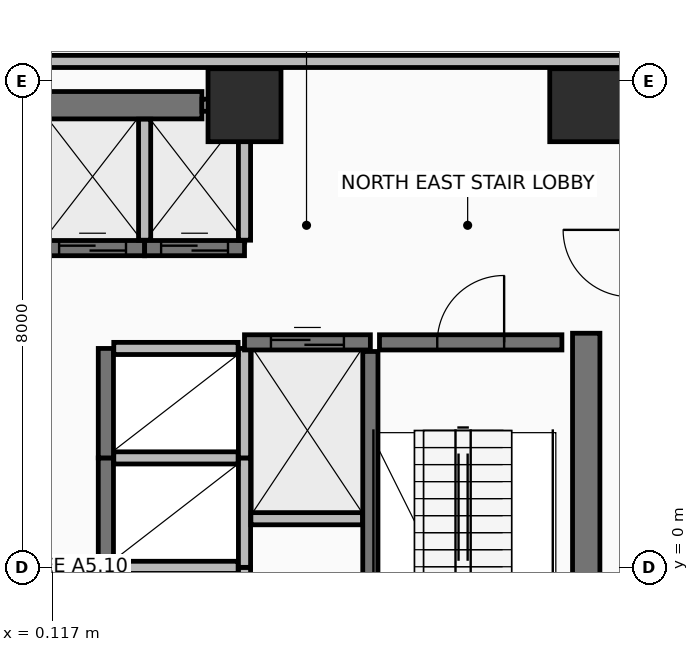
"""IFC4 building model, lengths in metres.
Left out: names, types, materials, properties, quantities, classifications, styles, units other than length and angle.
Written with IfcOpenShell. Run it as: python <this file> out.ifc"""

import sys

from ifc_helpers import new_model, si_unit, direction, frame, frame_2d, origin, origin_2d, place, context, subcontext, project, spatial, rectangle, extrude, element, fill, save


model = new_model("IFC4")
c1 = context("Model", 3, precision=1e-05, world=origin(), true_north=direction((0.0, 1.0)))
c2 = subcontext(c1, "Body", "Model", "MODEL_VIEW")
j1 = project(units=[si_unit("LENGTHUNIT", "METRE"), si_unit("PLANEANGLEUNIT", "RADIAN")], contexts=[c1])
p1 = place(None, origin())
s1 = spatial("IfcSite", under=j1, at=p1, CompositionType="ELEMENT")
p2 = place(p1, origin())
s2 = spatial("IfcBuilding", under=s1, at=p2, CompositionType="ELEMENT")
p3 = place(p2, frame((0.0, 0.0, 177.7)))
s3 = spatial("IfcBuildingStorey", under=s2, at=p3, CompositionType="ELEMENT", Elevation=177.7)
for number, where, z_axis, x_axis in (
    (1, (8.9, 7.6, 0.0), (0.0, 0.0, 1.0), (1.0, 0.0, 0.0)),
    (2, (3.28, 7.6, 0.0), (0.0, 0.0, 1.0), (1.0, 0.0, 0.0)),
):
    element("IfcColumn", number, at=place(p3, frame(where, z_axis=z_axis, x_axis=x_axis)), inside=s3, PredefinedType="COLUMN", context=c2, shape_type="SweptSolid", body=[
        extrude(rectangle(XDim=1.2, YDim=1.2, at=origin_2d()), origin(), (0.0, 0.0, 1.0), 3.6),
    ])
p4 = place(p3, frame((-2.8, 7.6, 0.0), z_axis=(0.0, 0.0, 1.0), x_axis=(1.0, 0.0, 0.0)))
e3 = element("IfcWall", 3, at=p4, inside=s3, PredefinedType="SHEAR", context=c2, shape_type="SweptSolid", body=[
    extrude(rectangle(XDim=5.38, YDim=0.45, at=frame_2d((2.69, 0.0))), origin(), (0.0, 0.0, 1.0), 3.42),
])
p5 = place(p3, frame((8.9, -6.85, 0.0), z_axis=(0.0, 0.0, 1.0), x_axis=(0.0, 1.0, 0.0)))
e4 = element("IfcWall", 4, at=p5, inside=s3, PredefinedType="SHEAR", context=c2, shape_type="SweptSolid", body=[
    extrude(rectangle(XDim=10.7, YDim=0.45, at=frame_2d((5.35, 0.0))), origin(), (0.0, 0.0, 1.0), 3.42),
])
p6 = place(p3, frame((9.62, 8.32, 0.0), z_axis=(0.0, 0.0, 1.0), x_axis=(-1.0, 0.0, 0.0)))
e5 = element("IfcWall", 5, at=p6, inside=s3, PredefinedType="PARTITIONING", context=c2, shape_type="SweptSolid", body=[
    extrude(rectangle(XDim=19.24, YDim=0.2, at=frame_2d((9.62, 0.0))), origin(), (0.0, 0.0, 1.0), 2.765),
])
p7 = place(p6, frame((15.745, 0.0, 0.0)))
e6 = element("IfcOpeningElement", 6, at=p7, cuts=e5, PredefinedType="OPENING", context=c2, shape_type="SweptSolid", body=[
    extrude(rectangle(XDim=0.9, YDim=2.1, at=frame_2d((0.45, 1.05))), frame((0.0, 0.11, 0.0), z_axis=(0.0, -1.0, 0.0), x_axis=(1.0, 0.0, 0.0)), (0.0, 0.0, 1.0), 0.22),
])
p8 = place(p6, frame((13.795, 0.0, 0.0)))
e7 = element("IfcOpeningElement", 7, at=p8, cuts=e5, PredefinedType="OPENING", context=c2, shape_type="SweptSolid", body=[
    extrude(rectangle(XDim=0.9, YDim=2.1, at=frame_2d((0.45, 1.05))), frame((0.0, 0.11, 0.0), z_axis=(0.0, -1.0, 0.0), x_axis=(1.0, 0.0, 0.0)), (0.0, 0.0, 1.0), 0.22),
])
p9 = place(p3, frame((5.35, -3.75, 0.0), z_axis=(0.0, 0.0, 1.0), x_axis=(0.0, 1.0, 0.0)))
e8 = element("IfcWall", 8, at=p9, inside=s3, PredefinedType="SHEAR", context=c2, shape_type="SweptSolid", body=[
    extrude(rectangle(XDim=7.3, YDim=0.25, at=frame_2d((3.65, 0.0))), origin(), (0.0, 0.0, 1.0), 3.42),
])
p10 = place(p3, frame((5.5, 3.7, 0.0), z_axis=(0.0, 0.0, 1.0), x_axis=(1.0, 0.0, 0.0)))
e9 = element("IfcWall", 9, at=p10, inside=s3, PredefinedType="SHEAR", context=c2, shape_type="SweptSolid", body=[
    extrude(rectangle(XDim=3.0, YDim=0.25, at=frame_2d((1.5, 0.0))), origin(), (0.0, 0.0, 1.0), 3.42),
])
p11 = place(p10, frame((0.95, 0.0, 0.0)))
e10 = element("IfcOpeningElement", 10, at=p11, cuts=e9, PredefinedType="OPENING", context=c2, shape_type="SweptSolid", body=[
    extrude(rectangle(XDim=1.1, YDim=2.15, at=frame_2d((0.55, 1.075))), frame((0.0, 0.135, 0.0), z_axis=(0.0, -1.0, 0.0), x_axis=(1.0, 0.0, 0.0)), (0.0, 0.0, 1.0), 0.27),
])
p12 = place(p3, frame((-0.075, 5.25, 0.0), z_axis=(0.0, 0.0, 1.0), x_axis=(1.0, 0.0, 0.0)))
e11 = element("IfcWall", 11, at=p12, inside=s3, PredefinedType="SHEAR", context=c2, shape_type="SweptSolid", body=[
    extrude(rectangle(XDim=1.712, YDim=0.25, at=frame_2d((0.856, 0.0))), origin(), (0.0, 0.0, 1.0), 3.42),
])
p13 = place(p12, frame((0.306, 0.0, 0.0)))
e12 = element("IfcOpeningElement", 12, at=p13, cuts=e11, PredefinedType="OPENING", context=c2, shape_type="SweptSolid", body=[
    extrude(rectangle(XDim=1.1, YDim=2.2, at=frame_2d((0.55, 1.1))), frame((0.0, 0.135, 0.0), z_axis=(0.0, -1.0, 0.0), x_axis=(1.0, 0.0, 0.0)), (0.0, 0.0, 1.0), 0.27),
])
p14 = place(p3, frame((1.637, 5.38, 0.0), z_axis=(0.0, 0.0, 1.0), x_axis=(0.0, 1.0, 0.0)))
e13 = element("IfcWall", 13, at=p14, inside=s3, PredefinedType="PARTITIONING", context=c2, shape_type="SweptSolid", body=[
    extrude(rectangle(XDim=1.99, YDim=0.2, at=frame_2d((0.995, 0.0))), origin(), (0.0, 0.0, 1.0), 2.715),
])
p15 = place(p3, frame((1.637, 5.25, 0.0), z_axis=(0.0, 0.0, 1.0), x_axis=(1.0, 0.0, 0.0)))
e14 = element("IfcWall", 14, at=p15, inside=s3, PredefinedType="SHEAR", context=c2, shape_type="SweptSolid", body=[
    extrude(rectangle(XDim=1.643, YDim=0.25, at=frame_2d((0.821, 0.0))), origin(), (0.0, 0.0, 1.0), 3.42),
])
p16 = place(p15, frame((0.271, 0.0, 0.0)))
e15 = element("IfcOpeningElement", 15, at=p16, cuts=e14, PredefinedType="OPENING", context=c2, shape_type="SweptSolid", body=[
    extrude(rectangle(XDim=1.1, YDim=2.2, at=frame_2d((0.55, 1.1))), frame((0.0, 0.135, 0.0), z_axis=(0.0, -1.0, 0.0), x_axis=(1.0, 0.0, 0.0)), (0.0, 0.0, 1.0), 0.27),
])
p17 = place(p3, frame((2.58, 7.6, 0.0), z_axis=(0.0, 0.0, 1.0), x_axis=(1.0, 0.0, 0.0)))
e16 = element("IfcWall", 16, at=p17, inside=s3, PredefinedType="PARTITIONING", context=c2, shape_type="SweptSolid", body=[
    extrude(rectangle(XDim=0.7, YDim=0.2, at=frame_2d((0.35, 0.0))), origin(), (0.0, 0.0, 1.0), 2.715),
])
p18 = place(p3, frame((3.28, 5.38, 0.0), z_axis=(0.0, 0.0, 1.0), x_axis=(0.0, 1.0, 0.0)))
e17 = element("IfcWall", 17, at=p18, inside=s3, PredefinedType="PARTITIONING", context=c2, shape_type="SweptSolid", body=[
    extrude(rectangle(XDim=2.115, YDim=0.2, at=frame_2d((1.058, 0.0))), origin(), (0.0, 0.0, 1.0), 2.715),
])
p19 = place(p3, frame((1.0, -1.8, 0.0), z_axis=(0.0, 0.0, 1.0), x_axis=(0.0, 1.0, 0.0)))
e18 = element("IfcWall", 18, at=p19, inside=s3, PredefinedType="SHEAR", context=c2, shape_type="SweptSolid", body=[
    extrude(rectangle(XDim=1.8, YDim=0.25, at=frame_2d((0.9, 0.0))), origin(), (0.0, 0.0, 1.0), 3.42),
])
p20 = place(p3, frame((3.28, -1.8, 0.0), z_axis=(0.0, 0.0, 1.0), x_axis=(0.0, 1.0, 0.0)))
e19 = element("IfcWall", 19, at=p20, inside=s3, PredefinedType="PARTITIONING", context=c2, shape_type="SweptSolid", body=[
    extrude(rectangle(XDim=1.8, YDim=0.2, at=frame_2d((0.9, 0.0))), origin(), (0.0, 0.0, 1.0), 3.42),
])
p21 = place(p3, frame((1.13, 0.0, 0.0), z_axis=(0.0, 0.0, 1.0), x_axis=(1.0, 0.0, 0.0)))
e20 = element("IfcWall", 20, at=p21, inside=s3, PredefinedType="PARTITIONING", context=c2, shape_type="SweptSolid", body=[
    extrude(rectangle(XDim=2.045, YDim=0.2, at=frame_2d((1.022, 0.0))), origin(), (0.0, 0.0, 1.0), 3.42),
])
p22 = place(p3, frame((1.0, 0.0, 0.0), z_axis=(0.0, 0.0, 1.0), x_axis=(0.0, 1.0, 0.0)))
e21 = element("IfcWall", 21, at=p22, inside=s3, PredefinedType="SHEAR", context=c2, shape_type="SweptSolid", body=[
    extrude(rectangle(XDim=1.8, YDim=0.25, at=frame_2d((0.9, 0.0))), origin(), (0.0, 0.0, 1.0), 3.42),
])
p23 = place(p3, frame((3.28, 0.0, 0.0), z_axis=(0.0, 0.0, 1.0), x_axis=(0.0, 1.0, 0.0)))
e22 = element("IfcWall", 22, at=p23, inside=s3, PredefinedType="PARTITIONING", context=c2, shape_type="SweptSolid", body=[
    extrude(rectangle(XDim=1.8, YDim=0.2, at=frame_2d((0.9, 0.0))), origin(), (0.0, 0.0, 1.0), 3.42),
])
p24 = place(p3, frame((1.13, 1.8, 0.0), z_axis=(0.0, 0.0, 1.0), x_axis=(1.0, 0.0, 0.0)))
e23 = element("IfcWall", 23, at=p24, inside=s3, PredefinedType="PARTITIONING", context=c2, shape_type="SweptSolid", body=[
    extrude(rectangle(XDim=2.045, YDim=0.2, at=frame_2d((1.022, 0.0))), origin(), (0.0, 0.0, 1.0), 3.42),
])
p25 = place(p3, frame((1.0, 1.8, 0.0), z_axis=(0.0, 0.0, 1.0), x_axis=(0.0, 1.0, 0.0)))
e24 = element("IfcWall", 24, at=p25, inside=s3, PredefinedType="SHEAR", context=c2, shape_type="SweptSolid", body=[
    extrude(rectangle(XDim=1.8, YDim=0.25, at=frame_2d((0.9, 0.0))), origin(), (0.0, 0.0, 1.0), 3.42),
])
p26 = place(p3, frame((3.28, 1.8, 0.0), z_axis=(0.0, 0.0, 1.0), x_axis=(0.0, 1.0, 0.0)))
e25 = element("IfcWall", 25, at=p26, inside=s3, PredefinedType="PARTITIONING", context=c2, shape_type="SweptSolid", body=[
    extrude(rectangle(XDim=1.8, YDim=0.2, at=frame_2d((0.9, 0.0))), origin(), (0.0, 0.0, 1.0), 3.42),
])
p27 = place(p3, frame((1.13, 3.6, 0.0), z_axis=(0.0, 0.0, 1.0), x_axis=(1.0, 0.0, 0.0)))
e26 = element("IfcWall", 26, at=p27, inside=s3, PredefinedType="PARTITIONING", context=c2, shape_type="SweptSolid", body=[
    extrude(rectangle(XDim=2.045, YDim=0.2, at=frame_2d((1.022, 0.0))), origin(), (0.0, 0.0, 1.0), 2.715),
])
p28 = place(p3, frame((3.28, 3.7, 0.0), z_axis=(0.0, 0.0, 1.0), x_axis=(1.0, 0.0, 0.0)))
e27 = element("IfcWall", 27, at=p28, inside=s3, PredefinedType="SHEAR", context=c2, shape_type="SweptSolid", body=[
    extrude(rectangle(XDim=2.07, YDim=0.25, at=frame_2d((1.035, 0.0))), origin(), (0.0, 0.0, 1.0), 3.42),
])
p29 = place(p28, frame((0.435, 0.0, 0.0)))
e28 = element("IfcOpeningElement", 28, at=p29, cuts=e27, PredefinedType="OPENING", context=c2, shape_type="SweptSolid", body=[
    extrude(rectangle(XDim=1.2, YDim=2.2, at=frame_2d((0.6, 1.1))), frame((0.0, 0.135, 0.0), z_axis=(0.0, -1.0, 0.0), x_axis=(1.0, 0.0, 0.0)), (0.0, 0.0, 1.0), 0.27),
])
p30 = place(p3, frame((3.385, 0.8, 0.0), z_axis=(0.0, 0.0, 1.0), x_axis=(1.0, 0.0, 0.0)))
e29 = element("IfcWall", 29, at=p30, inside=s3, PredefinedType="PARTITIONING", context=c2, shape_type="SweptSolid", body=[
    extrude(rectangle(XDim=1.835, YDim=0.2, at=frame_2d((0.917, 0.0))), origin(), (0.0, 0.0, 1.0), 3.42),
])
p31 = place(p11, frame((1.1, 0.0, 0.0), z_axis=(0.0, 0.0, 1.0), x_axis=(-1.0, 0.0, 0.0)))
e30 = element("IfcDoor", 30, at=p31, inside=s3, OperationType="SINGLE_SWING_LEFT", PredefinedType="DOOR", context=c2, shape_type="SweptSolid", body=[
    extrude(rectangle(XDim=1.1, YDim=2.15, at=frame_2d((0.55, 1.075))), frame((0.0, 0.025, 0.0), z_axis=(0.0, -1.0, 0.0), x_axis=(1.0, 0.0, 0.0)), (0.0, 0.0, 1.0), 0.05),
])
fill(e10, e30)
p32 = place(p13, origin())
e31 = element("IfcDoor", 31, at=p32, inside=s3, OperationType="SLIDING_TO_LEFT", PredefinedType="DOOR", context=c2, shape_type="SweptSolid", body=[
    extrude(rectangle(XDim=1.1, YDim=2.2, at=frame_2d((0.55, 1.1))), frame((0.0, 0.025, 0.0), z_axis=(0.0, -1.0, 0.0), x_axis=(1.0, 0.0, 0.0)), (0.0, 0.0, 1.0), 0.05),
])
fill(e12, e31)
p33 = place(p16, origin())
e32 = element("IfcDoor", 32, at=p33, inside=s3, OperationType="SLIDING_TO_LEFT", PredefinedType="DOOR", context=c2, shape_type="SweptSolid", body=[
    extrude(rectangle(XDim=1.1, YDim=2.2, at=frame_2d((0.55, 1.1))), frame((0.0, 0.025, 0.0), z_axis=(0.0, -1.0, 0.0), x_axis=(1.0, 0.0, 0.0)), (0.0, 0.0, 1.0), 0.05),
])
fill(e15, e32)
p34 = place(p29, origin())
e33 = element("IfcDoor", 33, at=p34, inside=s3, OperationType="SLIDING_TO_RIGHT", PredefinedType="DOOR", context=c2, shape_type="SweptSolid", body=[
    extrude(rectangle(XDim=1.2, YDim=2.2, at=frame_2d((0.6, 1.1))), frame((0.0, 0.025, 0.0), z_axis=(0.0, -1.0, 0.0), x_axis=(1.0, 0.0, 0.0)), (0.0, 0.0, 1.0), 0.05),
])
fill(e28, e33)
save(model, sys.argv[1])
